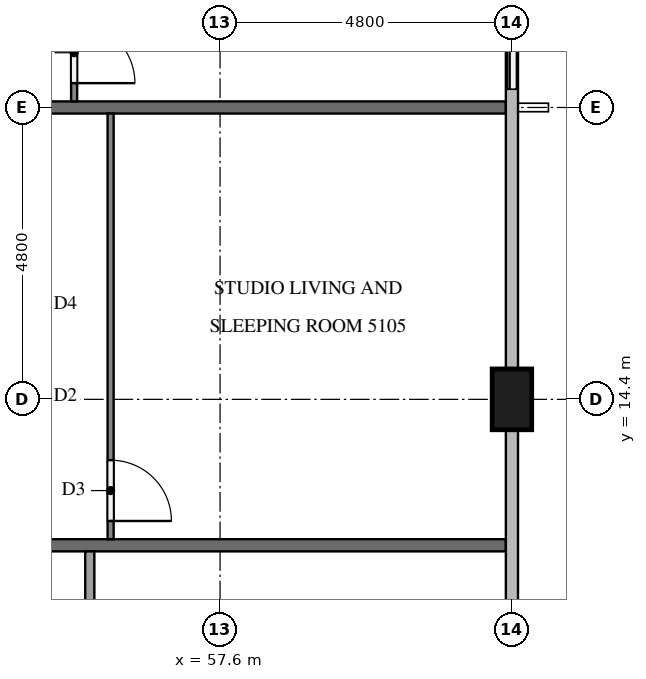
"""IFC4 building model, lengths in metres.
Left out: names, types, materials, properties, quantities, classifications, styles, units other than length and angle.
Written with IfcOpenShell. Run it as: python <this file> out.ifc"""

import sys

from ifc_helpers import new_model, si_unit, direction, frame, frame_2d, origin, origin_2d, place, context, subcontext, project, spatial, rectangle, extrude, element, fill, save


model = new_model("IFC4")
c1 = context("Model", 3, precision=1e-05, world=origin(), true_north=direction((0.0, 1.0)))
c2 = subcontext(c1, "Body", "Model", "MODEL_VIEW")
j1 = project(units=[si_unit("LENGTHUNIT", "METRE"), si_unit("PLANEANGLEUNIT", "RADIAN")], contexts=[c1])
p1 = place(None, origin())
s1 = spatial("IfcSite", under=j1, at=p1, CompositionType="ELEMENT")
p2 = place(p1, origin())
s2 = spatial("IfcBuilding", under=s1, at=p2, CompositionType="ELEMENT")
p3 = place(p2, frame((0.0, 0.0, 196.4)))
s3 = spatial("IfcBuildingStorey", under=s2, at=p3, CompositionType="ELEMENT", Elevation=196.4)
p4 = place(p3, frame((62.4, 14.4, 0.0), z_axis=(0.0, 0.0, 1.0), x_axis=(0.0, 1.0, 0.0)))
e1 = element("IfcColumn", 1, at=p4, inside=s3, PredefinedType="COLUMN", context=c2, shape_type="SweptSolid", body=[
    extrude(rectangle(XDim=1.0, YDim=0.65, at=origin_2d()), origin(), (0.0, 0.0, 1.0), 3.2),
])
p5 = place(p3, frame((62.4, 19.2, 0.0), z_axis=(0.0, 0.0, 1.0), x_axis=(0.0, 1.0, 0.0)))
e2 = element("IfcWall", 2, at=p5, inside=s3, PredefinedType="SOLIDWALL", context=c2, shape_type="SweptSolid", body=[
    extrude(rectangle(XDim=2.4, YDim=0.15, at=frame_2d((1.2, 0.0))), origin(), (0.0, 0.0, 1.0), 3.2),
])
p6 = place(p5, frame((0.3, 0.0, 0.0)))
e3 = element("IfcOpeningElement", 3, at=p6, cuts=e2, PredefinedType="OPENING", context=c2, shape_type="SweptSolid", body=[
    extrude(rectangle(XDim=1.8, YDim=2.4, at=frame_2d((0.9, 1.2))), frame((0.0, 0.085, 0.0), z_axis=(0.0, -1.0, 0.0), x_axis=(1.0, 0.0, 0.0)), (0.0, 0.0, 1.0), 0.17),
])
for number, where, z_axis, x_axis in (
    (4, (50.5, 12.0, 0.0), (0.0, 0.0, 1.0), (1.0, 0.0, 0.0)),
    (5, (50.5, 19.2, 0.0), (0.0, 0.0, 1.0), (1.0, 0.0, 0.0)),
):
    element("IfcWall", number, at=place(p3, frame(where, z_axis=z_axis, x_axis=x_axis)), inside=s3, PredefinedType="PARTITIONING", context=c2, shape_type="SweptSolid", body=[
        extrude(rectangle(XDim=11.8, YDim=0.2, at=frame_2d((5.9, 0.0))), origin(), (0.0, 0.0, 1.0), 3.2),
    ])
p7 = place(p3, frame((55.458, 11.9, 0.0), z_axis=(0.0, 0.0, 1.0), x_axis=(0.0, -1.0, 0.0)))
e6 = element("IfcWall", 6, at=p7, inside=s3, PredefinedType="PARTITIONING", context=c2, shape_type="SweptSolid", body=[
    extrude(rectangle(XDim=4.175, YDim=0.15, at=frame_2d((2.087, 0.0))), origin(), (0.0, 0.0, 1.0), 3.2),
])
p8 = place(p3, frame((55.8, 19.1, 0.0), z_axis=(0.0, 0.0, 1.0), x_axis=(0.0, -1.0, 0.0)))
e7 = element("IfcWall", 7, at=p8, inside=s3, PredefinedType="PARTITIONING", context=c2, shape_type="SweptSolid", body=[
    extrude(rectangle(XDim=7.0, YDim=0.1, at=frame_2d((3.5, 0.0))), origin(), (0.0, 0.0, 1.0), 3.2),
])
p9 = place(p8, frame((5.7, 0.0, 0.0)))
e8 = element("IfcOpeningElement", 8, at=p9, cuts=e7, PredefinedType="OPENING", context=c2, shape_type="SweptSolid", body=[
    extrude(rectangle(XDim=1.0, YDim=2.1, at=frame_2d((0.5, 1.05))), frame((0.0, 0.06, 0.0), z_axis=(0.0, -1.0, 0.0), x_axis=(1.0, 0.0, 0.0)), (0.0, 0.0, 1.0), 0.12),
])
p10 = place(p3, frame((55.2, 26.3, 0.0), z_axis=(0.0, 0.0, 1.0), x_axis=(0.0, -1.0, 0.0)))
e9 = element("IfcWall", 9, at=p10, inside=s3, PredefinedType="PARTITIONING", context=c2, shape_type="SweptSolid", body=[
    extrude(rectangle(XDim=7.0, YDim=0.1, at=frame_2d((3.5, 0.0))), origin(), (0.0, 0.0, 1.0), 3.2),
])
p11 = place(p10, frame((5.7, 0.0, 0.0)))
e10 = element("IfcOpeningElement", 10, at=p11, cuts=e9, PredefinedType="OPENING", context=c2, shape_type="SweptSolid", body=[
    extrude(rectangle(XDim=1.0, YDim=2.1, at=frame_2d((0.5, 1.05))), frame((0.0, 0.06, 0.0), z_axis=(0.0, -1.0, 0.0), x_axis=(1.0, 0.0, 0.0)), (0.0, 0.0, 1.0), 0.12),
])
p12 = place(p6, origin())
e11 = element("IfcDoor", 11, at=p12, inside=s3, OperationType="SLIDING_TO_RIGHT", PredefinedType="DOOR", context=c2, shape_type="SweptSolid", body=[
    extrude(rectangle(XDim=1.8, YDim=2.4, at=frame_2d((0.9, 1.2))), frame((0.0, 0.025, 0.0), z_axis=(0.0, -1.0, 0.0), x_axis=(1.0, 0.0, 0.0)), (0.0, 0.0, 1.0), 0.05),
])
fill(e3, e11)
p13 = place(p9, origin())
e12 = element("IfcDoor", 12, at=p13, inside=s3, OperationType="SINGLE_SWING_RIGHT", PredefinedType="DOOR", context=c2, shape_type="SweptSolid", body=[
    extrude(rectangle(XDim=1.0, YDim=2.1, at=frame_2d((0.5, 1.05))), frame((0.0, 0.025, 0.0), z_axis=(0.0, -1.0, 0.0), x_axis=(1.0, 0.0, 0.0)), (0.0, 0.0, 1.0), 0.05),
])
fill(e8, e12)
p14 = place(p11, origin())
e13 = element("IfcDoor", 13, at=p14, inside=s3, OperationType="SINGLE_SWING_RIGHT", PredefinedType="DOOR", context=c2, shape_type="SweptSolid", body=[
    extrude(rectangle(XDim=1.0, YDim=2.1, at=frame_2d((0.5, 1.05))), frame((0.0, 0.025, 0.0), z_axis=(0.0, -1.0, 0.0), x_axis=(1.0, 0.0, 0.0)), (0.0, 0.0, 1.0), 0.05),
])
fill(e10, e13)
save(model, sys.argv[1])
